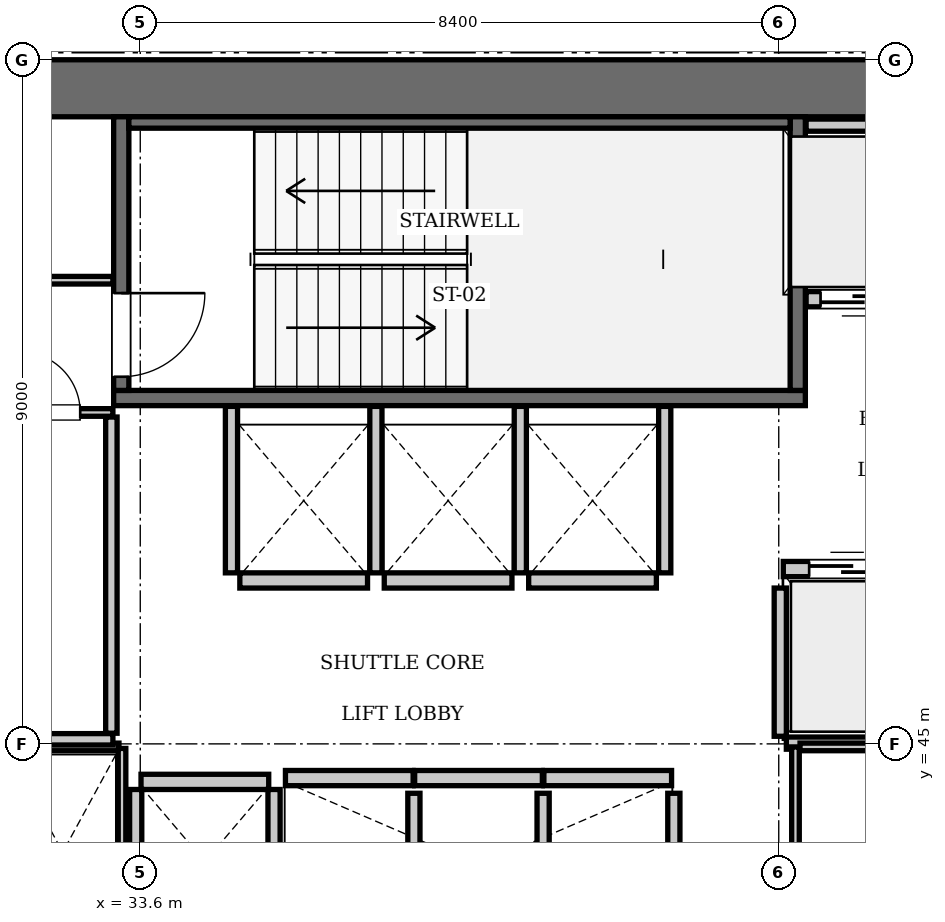
"""IFC4 building model, lengths in metres.
Left out: names, types, materials, properties, quantities, classifications, styles, units other than length and angle.
Written with IfcOpenShell. Run it as: python <this file> out.ifc"""

import sys

from ifc_helpers import new_model, si_unit, direction, frame, frame_2d, origin, place, context, subcontext, project, spatial, rectangle, extrude, element, fill, save


model = new_model("IFC4")
c1 = context("Model", 3, precision=1e-05, world=origin(), true_north=direction((0.0, 1.0)))
c2 = subcontext(c1, "Body", "Model", "MODEL_VIEW")
j1 = project(units=[si_unit("LENGTHUNIT", "METRE"), si_unit("PLANEANGLEUNIT", "RADIAN")], contexts=[c1])
p1 = place(None, origin())
s1 = spatial("IfcSite", under=j1, at=p1, CompositionType="ELEMENT")
p2 = place(p1, origin())
s2 = spatial("IfcBuilding", under=s1, at=p2, CompositionType="ELEMENT")
p3 = place(p2, frame((0.0, 0.0, 154.35)))
s3 = spatial("IfcBuildingStorey", under=s2, at=p3, CompositionType="ELEMENT", Elevation=154.35)
p4 = place(p3, frame((25.2, 53.625, 0.0), z_axis=(0.0, 0.0, 1.0), x_axis=(1.0, 0.0, 0.0)))
e1 = element("IfcWall", 1, at=p4, inside=s3, PredefinedType="SHEAR", context=c2, shape_type="SweptSolid", body=[
    extrude(rectangle(XDim=25.2, YDim=0.75, at=frame_2d((12.6, 0.0))), origin(), (0.0, 0.0, 1.0), 3.85),
])
p5 = place(p3, frame((33.25, 49.55, 0.0), z_axis=(0.0, 0.0, 1.0), x_axis=(1.0, 0.0, 0.0)))
e2 = element("IfcWall", 2, at=p5, inside=s3, PredefinedType="SOLIDWALL", context=c2, shape_type="SweptSolid", body=[
    extrude(rectangle(XDim=9.1, YDim=0.2, at=frame_2d((4.55, 0.0))), origin(), (0.0, 0.0, 1.0), 3.61),
])
p6 = place(p3, frame((42.25, 49.65, 0.0), z_axis=(0.0, 0.0, 1.0), x_axis=(0.0, 1.0, 0.0)))
e3 = element("IfcWall", 3, at=p6, inside=s3, PredefinedType="SOLIDWALL", context=c2, shape_type="SweptSolid", body=[
    extrude(rectangle(XDim=3.6, YDim=0.2, at=frame_2d((1.8, 0.0))), origin(), (0.0, 0.0, 1.0), 3.61),
])
p7 = place(p3, frame((33.35, 49.65, 0.0), z_axis=(0.0, 0.0, 1.0), x_axis=(0.0, 1.0, 0.0)))
e4 = element("IfcWall", 4, at=p7, inside=s3, PredefinedType="SOLIDWALL", context=c2, shape_type="SweptSolid", body=[
    extrude(rectangle(XDim=3.6, YDim=0.2, at=frame_2d((1.8, 0.0))), origin(), (0.0, 0.0, 1.0), 3.61),
])
p8 = place(p7, frame((0.18, 0.0, 0.0)))
e5 = element("IfcOpeningElement", 5, at=p8, cuts=e4, PredefinedType="OPENING", context=c2, shape_type="SweptSolid", body=[
    extrude(rectangle(XDim=1.1, YDim=2.15, at=frame_2d((0.55, 1.075))), frame((0.0, 0.11, 0.0), z_axis=(0.0, -1.0, 0.0), x_axis=(1.0, 0.0, 0.0)), (0.0, 0.0, 1.0), 0.22),
])
p9 = place(p3, frame((33.45, 53.175, 0.0), z_axis=(0.0, 0.0, 1.0), x_axis=(1.0, 0.0, 0.0)))
e6 = element("IfcWall", 6, at=p9, inside=s3, PredefinedType="SOLIDWALL", context=c2, shape_type="SweptSolid", body=[
    extrude(rectangle(XDim=8.7, YDim=0.15, at=frame_2d((4.35, 0.0))), origin(), (0.0, 0.0, 1.0), 3.61),
])
p10 = place(p3, frame((42.06, 47.3, 0.0), z_axis=(0.0, 0.0, 1.0), x_axis=(1.0, 0.0, 0.0)))
e7 = element("IfcWall", 7, at=p10, inside=s3, PredefinedType="SOLIDWALL", context=c2, shape_type="SweptSolid", body=[
    extrude(rectangle(XDim=1.68, YDim=0.2, at=frame_2d((0.84, 0.0))), origin(), (0.0, 0.0, 1.0), 3.61),
])
p11 = place(p10, frame((0.34, 0.0, 0.0)))
e8 = element("IfcOpeningElement", 8, at=p11, cuts=e7, PredefinedType="OPENING", context=c2, shape_type="SweptSolid", body=[
    extrude(rectangle(XDim=1.0, YDim=2.15, at=frame_2d((0.5, 1.075))), frame((0.0, 0.11, 0.0), z_axis=(0.0, -1.0, 0.0), x_axis=(1.0, 0.0, 0.0)), (0.0, 0.0, 1.0), 0.22),
])
p12 = place(p3, frame((42.36, 50.85, 0.0), z_axis=(0.0, 0.0, 1.0), x_axis=(1.0, 0.0, 0.0)))
e9 = element("IfcWall", 9, at=p12, inside=s3, PredefinedType="SOLIDWALL", context=c2, shape_type="SweptSolid", body=[
    extrude(rectangle(XDim=1.38, YDim=0.2, at=frame_2d((0.69, 0.0))), origin(), (0.0, 0.0, 1.0), 3.61),
])
p13 = place(p12, frame((0.19, 0.0, 0.0)))
e10 = element("IfcOpeningElement", 10, at=p13, cuts=e9, PredefinedType="OPENING", context=c2, shape_type="SweptSolid", body=[
    extrude(rectangle(XDim=1.0, YDim=2.15, at=frame_2d((0.5, 1.075))), frame((0.0, 0.11, 0.0), z_axis=(0.0, -1.0, 0.0), x_axis=(1.0, 0.0, 0.0)), (0.0, 0.0, 1.0), 0.22),
])
for number, where, z_axis, x_axis in (
    (11, (35.51, 44.55, 0.0), (0.0, 0.0, 1.0), (1.0, 0.0, 0.0)),
    (12, (37.21, 44.55, 0.0), (0.0, 0.0, 1.0), (1.0, 0.0, 0.0)),
):
    element("IfcWall", number, at=place(p3, frame(where, z_axis=z_axis, x_axis=x_axis)), inside=s3, PredefinedType="SOLIDWALL", context=c2, shape_type="SweptSolid", body=[
        extrude(rectangle(XDim=1.68, YDim=0.2, at=frame_2d((0.84, 0.0))), origin(), (0.0, 0.0, 1.0), 3.61),
    ])
for number, where, z_axis, x_axis in (
    (13, (38.91, 44.55, 0.0), (0.0, 0.0, 1.0), (1.0, 0.0, 0.0)),
    (14, (34.91, 47.15, 0.0), (0.0, 0.0, 1.0), (1.0, 0.0, 0.0)),
):
    element("IfcWall", number, at=place(p3, frame(where, z_axis=z_axis, x_axis=x_axis)), inside=s3, PredefinedType="SOLIDWALL", context=c2, shape_type="SweptSolid", body=[
        extrude(rectangle(XDim=1.68, YDim=0.2, at=frame_2d((0.84, 0.0))), origin(), (0.0, 0.0, 1.0), 3.61),
    ])
for number, where, z_axis, x_axis in (
    (15, (36.81, 47.15, 0.0), (0.0, 0.0, 1.0), (1.0, 0.0, 0.0)),
    (16, (38.71, 47.15, 0.0), (0.0, 0.0, 1.0), (1.0, 0.0, 0.0)),
    (17, (33.61, 44.5, 0.0), (0.0, 0.0, 1.0), (1.0, 0.0, 0.0)),
):
    element("IfcWall", number, at=place(p3, frame(where, z_axis=z_axis, x_axis=x_axis)), inside=s3, PredefinedType="SOLIDWALL", context=c2, shape_type="SweptSolid", body=[
        extrude(rectangle(XDim=1.68, YDim=0.2, at=frame_2d((0.84, 0.0))), origin(), (0.0, 0.0, 1.0), 3.61),
    ])
p14 = place(p3, frame((42.02, 45.1, 0.0), z_axis=(0.0, 0.0, 1.0), x_axis=(0.0, 1.0, 0.0)))
e18 = element("IfcWall", 18, at=p14, inside=s3, PredefinedType="SOLIDWALL", context=c2, shape_type="SweptSolid", body=[
    extrude(rectangle(XDim=1.95, YDim=0.16, at=frame_2d((0.975, 0.0))), origin(), (0.0, 0.0, 1.0), 3.61),
])
p15 = place(p3, frame((42.1, 45.01, 0.0), z_axis=(0.0, 0.0, 1.0), x_axis=(1.0, 0.0, 0.0)))
e19 = element("IfcWall", 19, at=p15, inside=s3, PredefinedType="SOLIDWALL", context=c2, shape_type="SweptSolid", body=[
    extrude(rectangle(XDim=3.45, YDim=0.16, at=frame_2d((1.725, 0.0))), origin(), (0.0, 0.0, 1.0), 3.61),
])
p16 = place(p3, frame((42.36, 53.14, 0.0), z_axis=(0.0, 0.0, 1.0), x_axis=(1.0, 0.0, 0.0)))
e20 = element("IfcWall", 20, at=p16, inside=s3, PredefinedType="SOLIDWALL", context=c2, shape_type="SweptSolid", body=[
    extrude(rectangle(XDim=3.14, YDim=0.16, at=frame_2d((1.57, 0.0))), origin(), (0.0, 0.0, 1.0), 3.61),
])
for number, where, z_axis, x_axis in (
    (21, (37.2, 42.15, 0.0), (0.0, 0.0, 1.0), (0.0, 1.0, 0.0)),
    (22, (38.9, 42.15, 0.0), (0.0, 0.0, 1.0), (0.0, 1.0, 0.0)),
    (23, (40.62, 42.15, 0.0), (0.0, 0.0, 1.0), (0.0, 1.0, 0.0)),
):
    element("IfcWall", number, at=place(p3, frame(where, z_axis=z_axis, x_axis=x_axis)), inside=s3, PredefinedType="SOLIDWALL", context=c2, shape_type="SweptSolid", body=[
        extrude(rectangle(XDim=2.2, YDim=0.16, at=frame_2d((1.1, 0.0))), origin(), (0.0, 0.0, 1.0), 3.61),
    ])
for number, where, z_axis, x_axis in (
    (24, (34.8, 47.25, 0.0), (0.0, 0.0, 1.0), (0.0, 1.0, 0.0)),
    (25, (36.7, 47.25, 0.0), (0.0, 0.0, 1.0), (0.0, 1.0, 0.0)),
    (26, (38.6, 47.25, 0.0), (0.0, 0.0, 1.0), (0.0, 1.0, 0.0)),
    (27, (40.5, 47.25, 0.0), (0.0, 0.0, 1.0), (0.0, 1.0, 0.0)),
):
    element("IfcWall", number, at=place(p3, frame(where, z_axis=z_axis, x_axis=x_axis)), inside=s3, PredefinedType="SOLIDWALL", context=c2, shape_type="SweptSolid", body=[
        extrude(rectangle(XDim=2.19, YDim=0.16, at=frame_2d((1.095, 0.0))), origin(), (0.0, 0.0, 1.0), 3.61),
    ])
for number, where, z_axis, x_axis in (
    (28, (33.54, 42.15, 0.0), (0.0, 0.0, 1.0), (0.0, 1.0, 0.0)),
    (29, (35.36, 42.15, 0.0), (0.0, 0.0, 1.0), (0.0, 1.0, 0.0)),
):
    element("IfcWall", number, at=place(p3, frame(where, z_axis=z_axis, x_axis=x_axis)), inside=s3, PredefinedType="SOLIDWALL", context=c2, shape_type="SweptSolid", body=[
        extrude(rectangle(XDim=2.25, YDim=0.16, at=frame_2d((1.125, 0.0))), origin(), (0.0, 0.0, 1.0), 3.61),
    ])
p17 = place(p3, frame((31.84, 44.96, 0.0), z_axis=(0.0, 0.0, 1.0), x_axis=(1.0, 0.0, 0.0)))
e30 = element("IfcWall", 30, at=p17, inside=s3, PredefinedType="PARTITIONING", context=c2, shape_type="SweptSolid", body=[
    extrude(rectangle(XDim=1.48, YDim=0.1, at=frame_2d((0.74, 0.0))), origin(), (0.0, 0.0, 1.0), 3.61),
])
p18 = place(p3, frame((33.36, 42.21, 0.0), z_axis=(0.0, 0.0, 1.0), x_axis=(0.0, 1.0, 0.0)))
e31 = element("IfcWall", 31, at=p18, inside=s3, PredefinedType="PARTITIONING", context=c2, shape_type="SweptSolid", body=[
    extrude(rectangle(XDim=2.73, YDim=0.1, at=frame_2d((1.365, 0.0))), origin(), (0.0, 0.0, 1.0), 3.61),
])
p19 = place(p3, frame((42.22, 42.2, 0.0), z_axis=(0.0, 0.0, 1.0), x_axis=(0.0, 1.0, 0.0)))
e32 = element("IfcWall", 32, at=p19, inside=s3, PredefinedType="PARTITIONING", context=c2, shape_type="SweptSolid", body=[
    extrude(rectangle(XDim=2.76, YDim=0.1, at=frame_2d((1.38, 0.0))), origin(), (0.0, 0.0, 1.0), 3.61),
])
p20 = place(p19, frame((0.65, 0.0, 0.0)))
e33 = element("IfcOpeningElement", 33, at=p20, cuts=e32, PredefinedType="OPENING", context=c2, shape_type="SweptSolid", body=[
    extrude(rectangle(XDim=0.8, YDim=2.05, at=frame_2d((0.4, 1.025))), frame((0.0, 0.06, 0.0), z_axis=(0.0, -1.0, 0.0), x_axis=(1.0, 0.0, 0.0)), (0.0, 0.0, 1.0), 0.12),
])
p21 = place(p3, frame((42.28, 44.96, 0.0), z_axis=(0.0, 0.0, 1.0), x_axis=(1.0, 0.0, 0.0)))
e34 = element("IfcWall", 34, at=p21, inside=s3, PredefinedType="PARTITIONING", context=c2, shape_type="SweptSolid", body=[
    extrude(rectangle(XDim=1.3, YDim=0.1, at=frame_2d((0.65, 0.0))), origin(), (0.0, 0.0, 1.0), 3.61),
])
p22 = place(p3, frame((30.06, 45.06, 0.0), z_axis=(0.0, 0.0, 1.0), x_axis=(1.0, 0.0, 0.0)))
e35 = element("IfcWall", 35, at=p22, inside=s3, PredefinedType="PARTITIONING", context=c2, shape_type="SweptSolid", body=[
    extrude(rectangle(XDim=3.18, YDim=0.15, at=frame_2d((1.59, 0.0))), origin(), (0.0, 0.0, 1.0), 3.61),
])
p23 = place(p3, frame((33.22, 45.14, 0.0), z_axis=(0.0, 0.0, 1.0), x_axis=(0.0, 1.0, 0.0)))
e36 = element("IfcWall", 36, at=p23, inside=s3, PredefinedType="PARTITIONING", context=c2, shape_type="SweptSolid", body=[
    extrude(rectangle(XDim=4.16, YDim=0.15, at=frame_2d((2.08, 0.0))), origin(), (0.0, 0.0, 1.0), 3.61),
])
p24 = place(p3, frame((30.06, 49.36, 0.0), z_axis=(0.0, 0.0, 1.0), x_axis=(1.0, 0.0, 0.0)))
e37 = element("IfcWall", 37, at=p24, inside=s3, PredefinedType="PARTITIONING", context=c2, shape_type="SweptSolid", body=[
    extrude(rectangle(XDim=3.18, YDim=0.1, at=frame_2d((1.59, 0.0))), origin(), (0.0, 0.0, 1.0), 3.61),
])
p25 = place(p24, frame((1.95, 0.0, 0.0)))
e38 = element("IfcOpeningElement", 38, at=p25, cuts=e37, PredefinedType="OPENING", context=c2, shape_type="SweptSolid", body=[
    extrude(rectangle(XDim=0.8, YDim=2.05, at=frame_2d((0.4, 1.025))), frame((0.0, 0.06, 0.0), z_axis=(0.0, -1.0, 0.0), x_axis=(1.0, 0.0, 0.0)), (0.0, 0.0, 1.0), 0.12),
])
p26 = place(p3, frame((31.82, 51.1, 0.0), z_axis=(0.0, 0.0, 1.0), x_axis=(1.0, 0.0, 0.0)))
e39 = element("IfcWall", 39, at=p26, inside=s3, PredefinedType="PARTITIONING", context=c2, shape_type="SweptSolid", body=[
    extrude(rectangle(XDim=1.42, YDim=0.1, at=frame_2d((0.71, 0.0))), origin(), (0.0, 0.0, 1.0), 3.61),
])
p27 = place(p8, frame((1.1, 0.0, 0.0), z_axis=(0.0, 0.0, 1.0), x_axis=(-1.0, 0.0, 0.0)))
e40 = element("IfcDoor", 40, at=p27, inside=s3, OperationType="SINGLE_SWING_LEFT", PredefinedType="DOOR", context=c2, shape_type="SweptSolid", body=[
    extrude(rectangle(XDim=1.1, YDim=2.15, at=frame_2d((0.55, 1.075))), frame((0.0, 0.025, 0.0), z_axis=(0.0, -1.0, 0.0), x_axis=(1.0, 0.0, 0.0)), (0.0, 0.0, 1.0), 0.05),
])
fill(e5, e40)
p28 = place(p11, origin())
e41 = element("IfcDoor", 41, at=p28, inside=s3, OperationType="SLIDING_TO_LEFT", PredefinedType="DOOR", context=c2, shape_type="SweptSolid", body=[
    extrude(rectangle(XDim=1.0, YDim=2.15, at=frame_2d((0.5, 1.075))), frame((0.0, 0.025, 0.0), z_axis=(0.0, -1.0, 0.0), x_axis=(1.0, 0.0, 0.0)), (0.0, 0.0, 1.0), 0.05),
])
fill(e8, e41)
p29 = place(p13, frame((1.0, 0.0, 0.0), z_axis=(0.0, 0.0, 1.0), x_axis=(-1.0, 0.0, 0.0)))
e42 = element("IfcDoor", 42, at=p29, inside=s3, OperationType="SLIDING_TO_LEFT", PredefinedType="DOOR", context=c2, shape_type="SweptSolid", body=[
    extrude(rectangle(XDim=1.0, YDim=2.15, at=frame_2d((0.5, 1.075))), frame((0.0, 0.025, 0.0), z_axis=(0.0, -1.0, 0.0), x_axis=(1.0, 0.0, 0.0)), (0.0, 0.0, 1.0), 0.05),
])
fill(e10, e42)
p30 = place(p25, origin())
e43 = element("IfcDoor", 43, at=p30, inside=s3, OperationType="SINGLE_SWING_LEFT", PredefinedType="DOOR", context=c2, shape_type="SweptSolid", body=[
    extrude(rectangle(XDim=0.8, YDim=2.05, at=frame_2d((0.4, 1.025))), frame((0.0, 0.025, 0.0), z_axis=(0.0, -1.0, 0.0), x_axis=(1.0, 0.0, 0.0)), (0.0, 0.0, 1.0), 0.05),
])
fill(e38, e43)
save(model, sys.argv[1])
